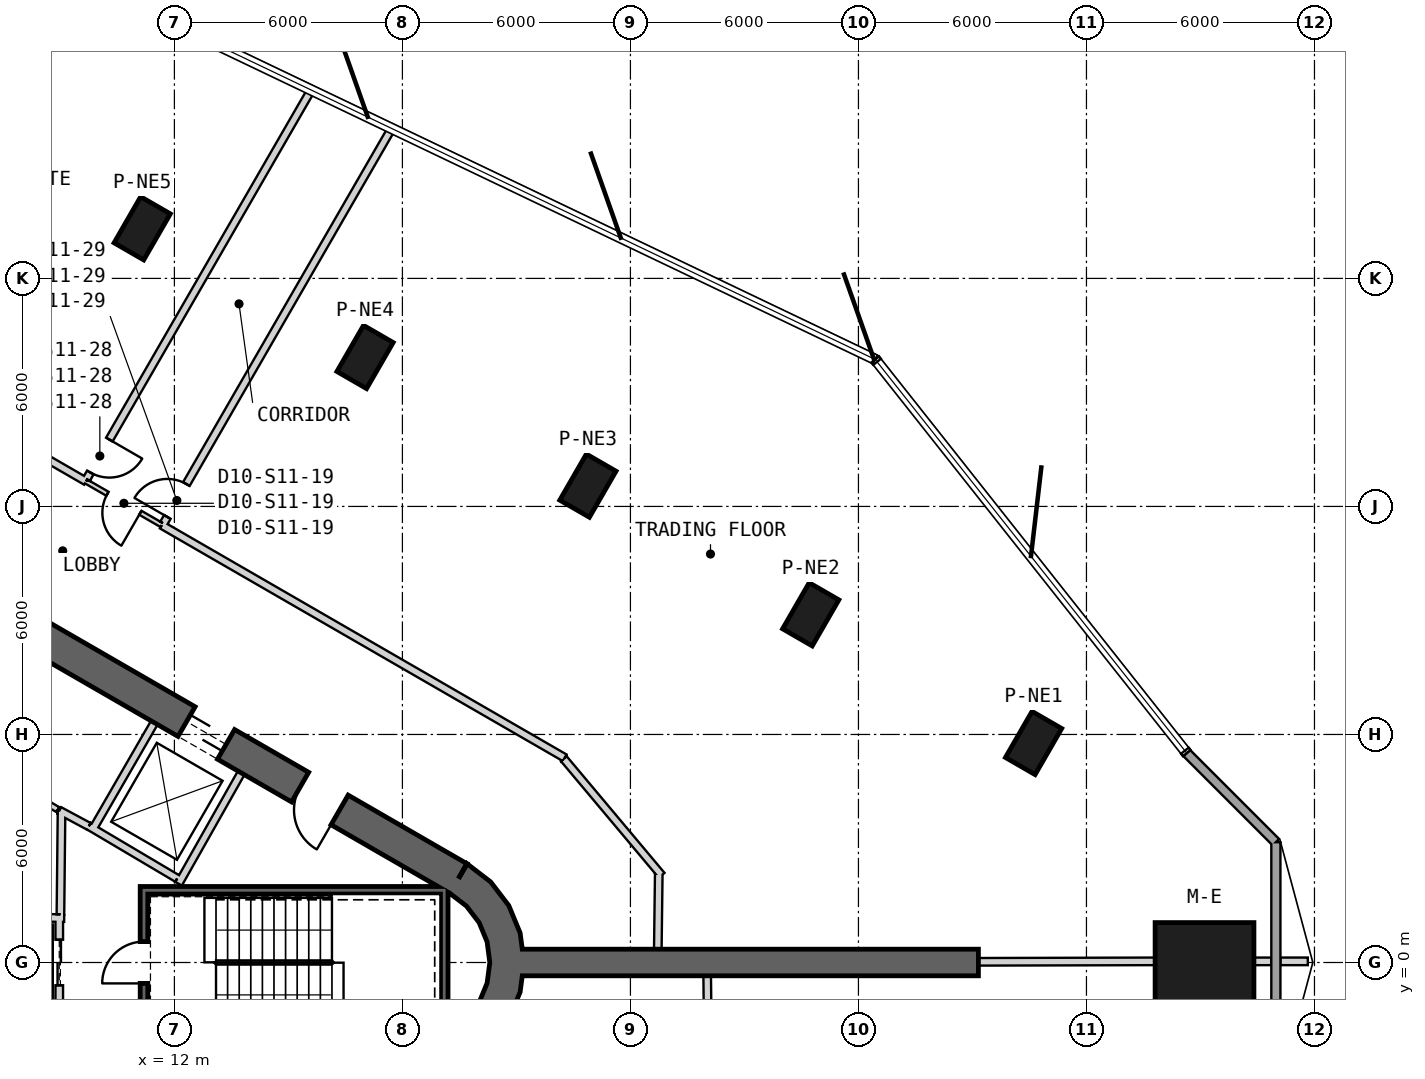
"""IFC4 building model, lengths in metres.
Left out: names, types, materials, properties, quantities, classifications, styles, units other than length and angle.
Written with IfcOpenShell. Run it as: python <this file> out.ifc"""

import sys

from ifc_helpers import new_model, si_unit, direction, frame, frame_2d, origin, origin_2d, place, context, subcontext, project, spatial, polyline, rectangle, outline, extrude, element, fill, save


model = new_model("IFC4")
c1 = context("Model", 3, precision=1e-05, world=origin(), true_north=direction((0.0, 1.0)))
c2 = subcontext(c1, "Body", "Model", "MODEL_VIEW")
j1 = project(units=[si_unit("LENGTHUNIT", "METRE"), si_unit("PLANEANGLEUNIT", "RADIAN")], contexts=[c1])
p1 = place(None, origin())
s1 = spatial("IfcSite", under=j1, at=p1, CompositionType="ELEMENT")
p2 = place(p1, origin())
s2 = spatial("IfcBuilding", under=s1, at=p2, CompositionType="ELEMENT")
p3 = place(p2, frame((0.0, 0.0, 193.2)))
s3 = spatial("IfcBuildingStorey", under=s2, at=p3, CompositionType="ELEMENT", Elevation=193.2)
p4 = place(p3, frame((39.107, 0.0, 0.0), z_axis=(0.0, 0.0, 1.0), x_axis=(1.0, 0.0, 0.0)))
e1 = element("IfcColumn", 1, at=p4, inside=s3, PredefinedType="COLUMN", context=c2, shape_type="SweptSolid", body=[
    extrude(rectangle(XDim=2.6, YDim=2.1, at=origin_2d()), origin(), (0.0, 0.0, 1.0), 4.0),
])
for number, where, z_axis, x_axis in (
    (2, (34.608, 5.775, 0.0), (0.0, 0.0, 1.0), (0.5, 0.866, 0.0)),
    (3, (28.744, 9.161, 0.0), (0.0, 0.0, 1.0), (0.5, 0.866, 0.0)),
    (4, (22.881, 12.546, 0.0), (0.0, 0.0, 1.0), (0.5, 0.866, 0.0)),
    (5, (17.017, 15.932, 0.0), (0.0, 0.0, 1.0), (0.5, 0.866, 0.0)),
    (6, (11.153, 19.317, 0.0), (0.0, 0.0, 1.0), (0.5, 0.866, 0.0)),
):
    element("IfcColumn", number, at=place(p3, frame(where, z_axis=z_axis, x_axis=x_axis)), inside=s3, PredefinedType="COLUMN", context=c2, shape_type="SweptSolid", body=[
        extrude(rectangle(XDim=1.4, YDim=0.9, at=origin_2d()), origin(), (0.0, 0.0, 1.0), 4.0),
    ])
p5 = place(p3, frame((19.475, 2.208, 0.0), z_axis=(0.0, 0.0, 1.0), x_axis=(-0.866028369851, 0.499994862586, 0.0)))
e7 = element("IfcWall", 7, at=p5, inside=s3, PredefinedType="SHEAR", context=c2, shape_type="SweptSolid", body=[
    extrude(rectangle(XDim=31.523, YDim=0.9, at=frame_2d((15.762, 0.0))), origin(), (0.0, 0.0, 1.0), 4.0),
])
p6 = place(p5, frame((7.062, 0.0, 0.0)))
e8 = element("IfcOpeningElement", 8, at=p6, cuts=e7, PredefinedType="OPENING", context=c2, shape_type="SweptSolid", body=[
    extrude(rectangle(XDim=1.2, YDim=2.4, at=frame_2d((0.6, 1.2))), frame((0.0, 0.46, 0.0), z_axis=(0.0, -1.0, 0.0), x_axis=(1.0, 0.0, 0.0)), (0.0, 0.0, 1.0), 0.92),
])
p7 = place(p5, frame((3.612, 0.0, 0.0)))
e9 = element("IfcOpeningElement", 9, at=p7, cuts=e7, PredefinedType="OPENING", context=c2, shape_type="SweptSolid", body=[
    extrude(rectangle(XDim=1.2, YDim=2.4, at=frame_2d((0.6, 1.2))), frame((0.0, 0.46, 0.0), z_axis=(0.0, -1.0, 0.0), x_axis=(1.0, 0.0, 0.0)), (0.0, 0.0, 1.0), 0.92),
])
p8 = place(p5, frame((26.712, 0.0, 0.0)))
e10 = element("IfcOpeningElement", 10, at=p8, cuts=e7, PredefinedType="OPENING", context=c2, shape_type="SweptSolid", body=[
    extrude(rectangle(XDim=1.2, YDim=2.4, at=frame_2d((0.6, 1.2))), frame((0.0, 0.46, 0.0), z_axis=(0.0, -1.0, 0.0), x_axis=(1.0, 0.0, 0.0)), (0.0, 0.0, 1.0), 0.92),
])
p9 = place(p3, origin())
e11 = element("IfcWall", 11, at=p9, inside=s3, PredefinedType="SHEAR", context=c2, shape_type="SweptSolid", body=[
    extrude(outline(polyline([(19.7, -2.598), (20.321, -2.121), (20.798, -1.5), (21.098, -0.777), (21.2, 0.0), (21.098, 0.777), (20.798, 1.5), (20.321, 2.121), (19.7, 2.598), (19.25, 1.819), (19.685, 1.485), (20.019, 1.05), (20.229, 0.543), (20.3, 0.0), (20.229, -0.543), (20.019, -1.05), (19.685, -1.485), (19.25, -1.819), (19.7, -2.598)])), origin(), (0.0, 0.0, 1.0), 4.0),
])
p10 = place(p3, frame((21.15, 0.0, 0.0), z_axis=(0.0, 0.0, 1.0), x_axis=(1.0, 0.0, 0.0)))
e12 = element("IfcWall", 12, at=p10, inside=s3, PredefinedType="SHEAR", context=c2, shape_type="SweptSolid", body=[
    extrude(rectangle(XDim=12.007, YDim=0.7, at=frame_2d((6.003, 0.0))), origin(), (0.0, 0.0, 1.0), 4.0),
])
p11 = place(p3, frame((40.984, -3.165, 0.0), z_axis=(0.0, 0.0, 1.0), x_axis=(0.0, 1.0, 0.0)))
e13 = element("IfcWall", 13, at=p11, inside=s3, PredefinedType="SOLIDWALL", context=c2, shape_type="SweptSolid", body=[
    extrude(rectangle(XDim=6.331, YDim=0.24, at=frame_2d((3.165, 0.0))), origin(), (0.0, 0.0, 1.0), 3.7),
])
p12 = place(p3, frame((40.984, 3.165, 0.0), z_axis=(0.0, 0.0, 1.0), x_axis=(-0.707106781187, 0.707106781187, 0.0)))
e14 = element("IfcWall", 14, at=p12, inside=s3, PredefinedType="SOLIDWALL", context=c2, shape_type="SweptSolid", body=[
    extrude(rectangle(XDim=3.316, YDim=0.24, at=frame_2d((1.658, 0.0))), origin(), (0.0, 0.0, 1.0), 3.7),
])
p13 = place(p3, frame((9.847, 3.495, 0.0), z_axis=(0.0, 0.0, 1.0), x_axis=(0.499984717929, 0.866034226713, 0.0)))
e15 = element("IfcWall", 15, at=p13, inside=s3, PredefinedType="PLUMBINGWALL", context=c2, shape_type="SweptSolid", body=[
    extrude(rectangle(XDim=3.25, YDim=0.2, at=frame_2d((1.625, 0.0))), origin(), (0.0, 0.0, 1.0), 3.7),
])
p14 = place(p3, frame((12.11, 2.073, 0.0), z_axis=(0.0, 0.0, 1.0), x_axis=(0.49196600604, 0.870614408852, 0.0)))
e16 = element("IfcWall", 16, at=p14, inside=s3, PredefinedType="PLUMBINGWALL", context=c2, shape_type="SweptSolid", body=[
    extrude(rectangle(XDim=3.35, YDim=0.2, at=frame_2d((1.675, 0.0))), origin(), (0.0, 0.0, 1.0), 3.7),
])
p15 = place(p3, frame((12.073, 2.211, 0.0), z_axis=(0.0, 0.0, 1.0), x_axis=(-0.860414880418, 0.509594185166, 0.0)))
e17 = element("IfcWall", 17, at=p15, inside=s3, PredefinedType="PLUMBINGWALL", context=c2, shape_type="SweptSolid", body=[
    extrude(rectangle(XDim=2.7, YDim=0.2, at=frame_2d((1.35, 0.0))), origin(), (0.0, 0.0, 1.0), 3.7),
])
p16 = place(p3, frame((19.2, 1.9, -0.3), z_axis=(0.0, 0.0, 1.0), x_axis=(-1.0, 0.0, 0.0)))
e18 = element("IfcWall", 18, at=p16, inside=s3, PredefinedType="SHEAR", context=c2, shape_type="SweptSolid", body=[
    extrude(rectangle(XDim=8.1, YDim=0.2, at=frame_2d((4.05, 0.0))), origin(), (0.0, 0.0, 1.0), 4.0),
])
p17 = place(p3, frame((19.1, -2.0, -0.3), z_axis=(0.0, 0.0, 1.0), x_axis=(0.0, 1.0, 0.0)))
e19 = element("IfcWall", 19, at=p17, inside=s3, PredefinedType="SHEAR", context=c2, shape_type="SweptSolid", body=[
    extrude(rectangle(XDim=3.8, YDim=0.2, at=frame_2d((1.9, 0.0))), origin(), (0.0, 0.0, 1.0), 4.0),
])
p18 = place(p3, frame((11.2, -1.8, -0.3), z_axis=(0.0, 0.0, 1.0), x_axis=(0.0, 1.0, 0.0)))
e20 = element("IfcWall", 20, at=p18, inside=s3, PredefinedType="SHEAR", context=c2, shape_type="SweptSolid", body=[
    extrude(rectangle(XDim=3.6, YDim=0.2, at=frame_2d((1.8, 0.0))), origin(), (0.0, 0.0, 1.0), 4.0),
])
p19 = place(p18, frame((1.25, 0.0, 0.3)))
e21 = element("IfcOpeningElement", 21, at=p19, cuts=e20, PredefinedType="OPENING", context=c2, shape_type="SweptSolid", body=[
    extrude(rectangle(XDim=1.1, YDim=2.1, at=frame_2d((0.55, 1.05))), frame((0.0, 0.11, 0.0), z_axis=(0.0, -1.0, 0.0), x_axis=(1.0, 0.0, 0.0)), (0.0, 0.0, 1.0), 0.22),
])
p20 = place(p3, frame((8.97, 1.2, 0.0), z_axis=(0.0, 0.0, 1.0), x_axis=(0.0, -1.0, 0.0)))
e22 = element("IfcWall", 22, at=p20, inside=s3, PredefinedType="PLUMBINGWALL", context=c2, shape_type="SweptSolid", body=[
    extrude(rectangle(XDim=2.4, YDim=0.2, at=frame_2d((1.2, 0.0))), origin(), (0.0, 0.0, 1.0), 3.7),
])
p21 = place(p20, frame((0.6, 0.0, 0.0)))
e23 = element("IfcOpeningElement", 23, at=p21, cuts=e22, PredefinedType="OPENING", context=c2, shape_type="SweptSolid", body=[
    extrude(rectangle(XDim=1.2, YDim=2.4, at=frame_2d((0.6, 1.2))), frame((0.0, 0.11, 0.0), z_axis=(0.0, -1.0, 0.0), x_axis=(1.0, 0.0, 0.0)), (0.0, 0.0, 1.0), 0.22),
])
p22 = place(p3, frame((6.0, 1.2, 0.0), z_axis=(0.0, 0.0, 1.0), x_axis=(0.999949988, -0.010001074852, 0.0)))
e24 = element("IfcWall", 24, at=p22, inside=s3, PredefinedType="PLUMBINGWALL", context=c2, shape_type="SweptSolid", body=[
    extrude(rectangle(XDim=3.1, YDim=0.2, at=frame_2d((1.55, 0.0))), origin(), (0.0, 0.0, 1.0), 3.7),
])
p23 = place(p3, frame((8.974, 3.999, 0.0), z_axis=(0.0, 0.0, 1.0), x_axis=(0.880917147855, -0.473270513147, 0.0)))
e25 = element("IfcWall", 25, at=p23, inside=s3, PredefinedType="PARTITIONING", context=c2, shape_type="SweptSolid", body=[
    extrude(rectangle(XDim=0.878, YDim=0.2, at=frame_2d((0.439, 0.0))), origin(), (0.0, 0.0, 1.0), 3.7),
])
p24 = place(p3, frame((8.931, 4.024, 0.0), z_axis=(0.0, 0.0, 1.0), x_axis=(-0.863936620311, 0.50360055211, 0.0)))
e26 = element("IfcWall", 26, at=p24, inside=s3, PredefinedType="PLUMBINGWALL", context=c2, shape_type="SweptSolid", body=[
    extrude(rectangle(XDim=7.072, YDim=0.15, at=frame_2d((3.536, 0.0))), origin(), (0.0, 0.0, 1.0), 3.7),
])
p25 = place(p3, frame((9.001, 1.27, 0.0), z_axis=(0.0, 0.0, 1.0), x_axis=(0.010747252091, 0.999942246619, 0.0)))
e27 = element("IfcWall", 27, at=p25, inside=s3, PredefinedType="PARTITIONING", context=c2, shape_type="SweptSolid", body=[
    extrude(rectangle(XDim=2.726, YDim=0.2, at=frame_2d((1.363, 0.0))), origin(), (0.0, 0.0, 1.0), 3.7),
])
p26 = place(p3, frame((11.667, 11.508, 0.0), z_axis=(0.0, 0.0, 1.0), x_axis=(-0.866053019151, 0.499952165731, 0.0)))
e28 = element("IfcWall", 28, at=p26, inside=s3, PredefinedType="PARTITIONING", context=c2, shape_type="SweptSolid", body=[
    extrude(rectangle(XDim=2.3, YDim=0.12, at=frame_2d((1.15, 0.0))), origin(), (0.0, 0.0, 1.0), 3.7),
])
p27 = place(p26, frame((0.65, 0.0, 0.0)))
e29 = element("IfcOpeningElement", 29, at=p27, cuts=e28, PredefinedType="OPENING", context=c2, shape_type="SweptSolid", body=[
    extrude(rectangle(XDim=1.0, YDim=2.1, at=frame_2d((0.5, 1.05))), frame((0.0, 0.07, 0.0), z_axis=(0.0, -1.0, 0.0), x_axis=(1.0, 0.0, 0.0)), (0.0, 0.0, 1.0), 0.14),
])
p28 = place(p3, frame((22.27, 5.386, 0.0), z_axis=(0.0, 0.0, 1.0), x_axis=(-0.866019551165, 0.500010136897, 0.0)))
e30 = element("IfcWall", 30, at=p28, inside=s3, PredefinedType="PARTITIONING", context=c2, shape_type="SweptSolid", body=[
    extrude(rectangle(XDim=12.243, YDim=0.2, at=frame_2d((6.122, 0.0))), origin(), (0.0, 0.0, 1.0), 2.88),
])
p29 = place(p3, frame((9.675, 12.658, 0.0), z_axis=(0.0, 0.0, 1.0), x_axis=(-0.866018456403, 0.500012033024, 0.0)))
e31 = element("IfcWall", 31, at=p29, inside=s3, PredefinedType="PARTITIONING", context=c2, shape_type="SweptSolid", body=[
    extrude(rectangle(XDim=12.285, YDim=0.2, at=frame_2d((6.143, 0.0))), origin(), (0.0, 0.0, 1.0), 2.98),
])
p30 = place(p3, frame((24.821, 2.294, 0.0), z_axis=(0.0, 0.0, 1.0), x_axis=(-0.642778579944, 0.766052019882, 0.0)))
e32 = element("IfcWall", 32, at=p30, inside=s3, PredefinedType="PARTITIONING", context=c2, shape_type="SweptSolid", body=[
    extrude(rectangle(XDim=4.002, YDim=0.2, at=frame_2d((2.001, 0.0))), origin(), (0.0, 0.0, 1.0), 2.78),
])
p31 = place(p3, frame((24.721, 0.35, 0.0), z_axis=(0.0, 0.0, 1.0), x_axis=(0.012552857034, 0.999921209786, 0.0)))
e33 = element("IfcWall", 33, at=p31, inside=s3, PredefinedType="PARTITIONING", context=c2, shape_type="SweptSolid", body=[
    extrude(rectangle(XDim=1.984, YDim=0.2, at=frame_2d((0.992, 0.0))), origin(), (0.0, 0.0, 1.0), 3.7),
])
p32 = place(p3, frame((26.047, -2.972, 0.0), z_axis=(0.0, 0.0, 1.0), x_axis=(-0.010519853563, 0.99994466481, 0.0)))
e34 = element("IfcWall", 34, at=p32, inside=s3, PredefinedType="PARTITIONING", context=c2, shape_type="SweptSolid", body=[
    extrude(rectangle(XDim=2.623, YDim=0.2, at=frame_2d((1.311, 0.0))), origin(), (0.0, 0.0, 1.0), 3.7),
])
p33 = place(p3, frame((15.599, 22.958, 0.0), z_axis=(0.0, 0.0, 1.0), x_axis=(-0.499990610615, -0.866030824681, 0.0)))
e35 = element("IfcWall", 35, at=p33, inside=s3, PredefinedType="PARTITIONING", context=c2, shape_type="SweptSolid", body=[
    extrude(rectangle(XDim=11.822, YDim=0.2, at=frame_2d((5.911, 0.0))), origin(), (0.0, 0.0, 1.0), 3.7),
])
p34 = place(p33, frame((10.621, 0.0, 0.0)))
e36 = element("IfcOpeningElement", 36, at=p34, cuts=e35, PredefinedType="OPENING", context=c2, shape_type="SweptSolid", body=[
    extrude(rectangle(XDim=1.0, YDim=2.1, at=frame_2d((0.5, 1.05))), frame((0.0, 0.11, 0.0), z_axis=(0.0, -1.0, 0.0), x_axis=(1.0, 0.0, 0.0)), (0.0, 0.0, 1.0), 0.22),
])
p35 = place(p3, frame((11.715, 11.55, 0.0), z_axis=(0.0, 0.0, 1.0), x_axis=(0.499988877688, 0.866031825159, 0.0)))
e37 = element("IfcWall", 37, at=p35, inside=s3, PredefinedType="PARTITIONING", context=c2, shape_type="SweptSolid", body=[
    extrude(rectangle(XDim=12.004, YDim=0.2, at=frame_2d((6.002, 0.0))), origin(), (0.0, 0.0, 1.0), 3.7),
])
p36 = place(p35, frame((0.2, 0.0, 0.0)))
e38 = element("IfcOpeningElement", 38, at=p36, cuts=e37, PredefinedType="OPENING", context=c2, shape_type="SweptSolid", body=[
    extrude(rectangle(XDim=1.0, YDim=2.1, at=frame_2d((0.5, 1.05))), frame((0.0, 0.11, 0.0), z_axis=(0.0, -1.0, 0.0), x_axis=(1.0, 0.0, 0.0)), (0.0, 0.0, 1.0), 0.22),
])
p37 = place(p3, frame((33.157, 0.018, 0.0), z_axis=(0.0, 0.0, 1.0), x_axis=(0.999996690576, 0.002572710167, 0.0)))
e39 = element("IfcWall", 39, at=p37, inside=s3, PredefinedType="PARTITIONING", context=c2, shape_type="SweptSolid", body=[
    extrude(rectangle(XDim=4.65, YDim=0.2, at=frame_2d((2.325, 0.0))), origin(), (0.0, 0.0, 1.0), 3.27),
])
p38 = place(p3, frame((40.407, 0.03, 0.0), z_axis=(0.0, 0.0, 1.0), x_axis=(1.0, 0.0, 0.0)))
e40 = element("IfcWall", 40, at=p38, inside=s3, PredefinedType="PARTITIONING", context=c2, shape_type="SweptSolid", body=[
    extrude(rectangle(XDim=0.458, YDim=0.2, at=frame_2d((0.229, 0.0))), origin(), (0.0, 0.0, 1.0), 3.7),
])
p39 = place(p3, frame((41.104, 0.03, 0.0), z_axis=(0.0, 0.0, 1.0), x_axis=(1.0, 0.0, 0.0)))
e41 = element("IfcWall", 41, at=p39, inside=s3, PredefinedType="PARTITIONING", context=c2, shape_type="SweptSolid", body=[
    extrude(rectangle(XDim=0.72, YDim=0.2, at=frame_2d((0.36, 0.0))), origin(), (0.0, 0.0, 1.0), 3.7),
])
p40 = place(p19, origin())
e42 = element("IfcDoor", 42, at=p40, inside=s3, OperationType="SINGLE_SWING_LEFT", PredefinedType="USERDEFINED", context=c2, shape_type="SweptSolid", body=[
    extrude(rectangle(XDim=1.1, YDim=2.1, at=frame_2d((0.55, 1.05))), frame((0.0, 0.025, 0.0), z_axis=(0.0, -1.0, 0.0), x_axis=(1.0, 0.0, 0.0)), (0.0, 0.0, 1.0), 0.05),
])
fill(e21, e42)
p41 = place(p21, origin())
e43 = element("IfcDoor", 43, at=p41, inside=s3, OperationType="SLIDING_TO_LEFT", PredefinedType="USERDEFINED", context=c2, shape_type="SweptSolid", body=[
    extrude(rectangle(XDim=1.2, YDim=2.4, at=frame_2d((0.6, 1.2))), frame((0.0, 0.025, 0.0), z_axis=(0.0, -1.0, 0.0), x_axis=(1.0, 0.0, 0.0)), (0.0, 0.0, 1.0), 0.05),
])
fill(e23, e43)
p42 = place(p27, origin())
e44 = element("IfcDoor", 44, at=p42, inside=s3, OperationType="SINGLE_SWING_LEFT", PredefinedType="NOTDEFINED", context=c2, shape_type="SweptSolid", body=[
    extrude(rectangle(XDim=1.0, YDim=2.1, at=frame_2d((0.5, 1.05))), frame((0.0, 0.025, 0.0), z_axis=(0.0, -1.0, 0.0), x_axis=(1.0, 0.0, 0.0)), (0.0, 0.0, 1.0), 0.05),
])
fill(e29, e44)
p43 = place(p34, origin())
e45 = element("IfcDoor", 45, at=p43, inside=s3, OperationType="SINGLE_SWING_RIGHT", PredefinedType="USERDEFINED", context=c2, shape_type="SweptSolid", body=[
    extrude(rectangle(XDim=1.0, YDim=2.1, at=frame_2d((0.5, 1.05))), frame((0.0, 0.025, 0.0), z_axis=(0.0, -1.0, 0.0), x_axis=(1.0, 0.0, 0.0)), (0.0, 0.0, 1.0), 0.05),
])
fill(e36, e45)
p44 = place(p36, origin())
e46 = element("IfcDoor", 46, at=p44, inside=s3, OperationType="SINGLE_SWING_RIGHT", PredefinedType="USERDEFINED", context=c2, shape_type="SweptSolid", body=[
    extrude(rectangle(XDim=1.0, YDim=2.1, at=frame_2d((0.5, 1.05))), frame((0.0, 0.025, 0.0), z_axis=(0.0, -1.0, 0.0), x_axis=(1.0, 0.0, 0.0)), (0.0, 0.0, 1.0), 0.05),
])
fill(e38, e46)
p45 = place(p6, origin())
e47 = element("IfcDoor", 47, at=p45, inside=s3, OperationType="SLIDING_TO_LEFT", PredefinedType="USERDEFINED", context=c2, shape_type="SweptSolid", body=[
    extrude(rectangle(XDim=1.2, YDim=2.4, at=frame_2d((0.6, 1.2))), frame((0.0, 0.025, 0.0), z_axis=(0.0, -1.0, 0.0), x_axis=(1.0, 0.0, 0.0)), (0.0, 0.0, 1.0), 0.05),
])
fill(e8, e47)
p46 = place(p7, origin())
e48 = element("IfcDoor", 48, at=p46, inside=s3, OperationType="SINGLE_SWING_RIGHT", PredefinedType="USERDEFINED", context=c2, shape_type="SweptSolid", body=[
    extrude(rectangle(XDim=1.2, YDim=2.4, at=frame_2d((0.6, 1.2))), frame((0.0, 0.025, 0.0), z_axis=(0.0, -1.0, 0.0), x_axis=(1.0, 0.0, 0.0)), (0.0, 0.0, 1.0), 0.05),
])
fill(e9, e48)
save(model, sys.argv[1])
